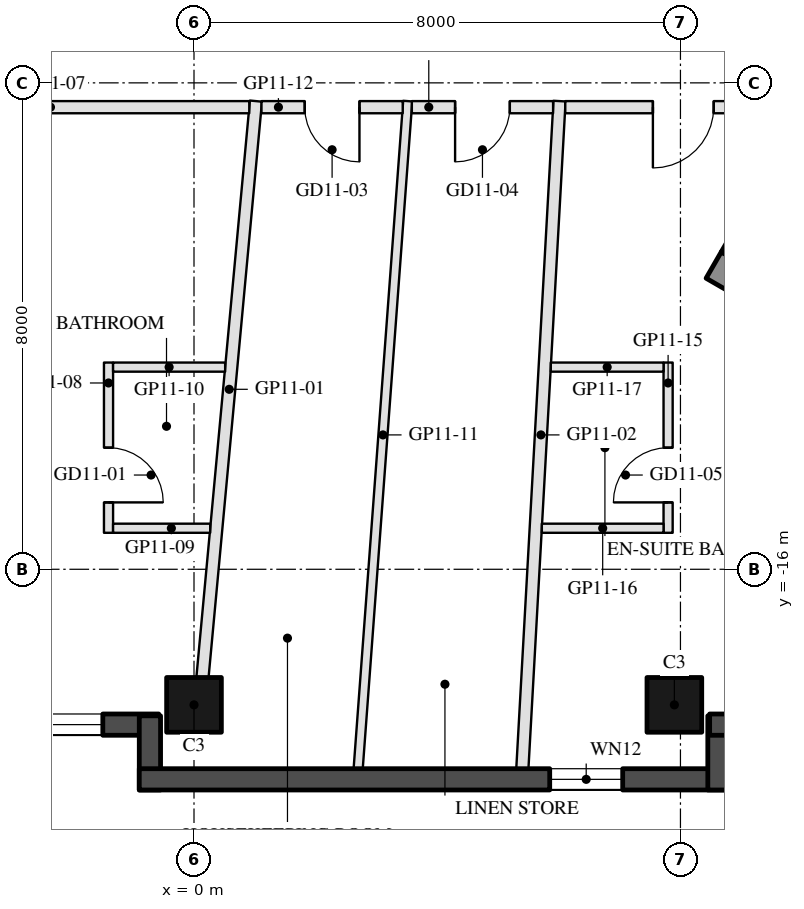
"""IFC4 building model, lengths in metres.
Left out: names, types, materials, properties, quantities, classifications, styles, units other than length and angle.
Written with IfcOpenShell. Run it as: python <this file> out.ifc"""

import sys

from ifc_helpers import new_model, si_unit, direction, frame, frame_2d, origin, origin_2d, place, context, subcontext, project, spatial, rectangle, hollow_rectangle, extrude, element, fill, save


model = new_model("IFC4")
c1 = context("Model", 3, precision=1e-05, world=origin(), true_north=direction((0.0, 1.0)))
c2 = subcontext(c1, "Body", "Model", "MODEL_VIEW")
j1 = project(units=[si_unit("LENGTHUNIT", "METRE"), si_unit("PLANEANGLEUNIT", "RADIAN")], contexts=[c1])
p1 = place(None, origin())
s1 = spatial("IfcSite", under=j1, at=p1, CompositionType="ELEMENT")
p2 = place(p1, origin())
s2 = spatial("IfcBuilding", under=s1, at=p2, CompositionType="ELEMENT")
p3 = place(p2, frame((0.0, 0.0, 124.2)))
s3 = spatial("IfcBuildingStorey", under=s2, at=p3, CompositionType="ELEMENT", Elevation=124.2)
for number, where, z_axis, x_axis in (
    (1, (0.0, -18.23, 0.0), (0.0, 0.0, 1.0), (-1.0, 0.0, 0.0)),
    (2, (7.9, -18.23, 0.0), (0.0, 0.0, 1.0), (-1.0, 0.0, 0.0)),
):
    element("IfcColumn", number, at=place(p3, frame(where, z_axis=z_axis, x_axis=x_axis)), inside=s3, PredefinedType="COLUMN", context=c2, shape_type="SweptSolid", body=[
        extrude(hollow_rectangle(XDim=0.9, YDim=0.9, WallThickness=0.04, at=origin_2d()), origin(), (0.0, 0.0, 1.0), 3.7),
    ])
p4 = place(p3, frame((-7.32, -18.555, 0.0), z_axis=(0.0, 0.0, 1.0), x_axis=(1.0, 0.0, 0.0)))
e3 = element("IfcWall", 3, at=p4, inside=s3, PredefinedType="SOLIDWALL", context=c2, shape_type="SweptSolid", body=[
    extrude(rectangle(XDim=6.74, YDim=0.35, at=frame_2d((3.37, 0.0))), origin(), (0.0, 0.0, 1.0), 3.55),
])
p5 = place(p4, frame((0.32, 0.0, 0.3)))
e4 = element("IfcOpeningElement", 4, at=p5, cuts=e3, PredefinedType="OPENING", context=c2, shape_type="SweptSolid", body=[
    extrude(rectangle(XDim=2.6, YDim=2.65, at=frame_2d((1.3, 1.325))), frame((0.0, 0.185, 0.0), z_axis=(0.0, -1.0, 0.0), x_axis=(1.0, 0.0, 0.0)), (0.0, 0.0, 1.0), 0.37),
])
p6 = place(p4, frame((3.22, 0.0, 0.3)))
e5 = element("IfcOpeningElement", 5, at=p6, cuts=e3, PredefinedType="OPENING", context=c2, shape_type="SweptSolid", body=[
    extrude(rectangle(XDim=2.6, YDim=2.65, at=frame_2d((1.3, 1.325))), frame((0.0, 0.185, 0.0), z_axis=(0.0, -1.0, 0.0), x_axis=(1.0, 0.0, 0.0)), (0.0, 0.0, 1.0), 0.37),
])
p7 = place(p3, frame((-0.725, -18.41, 0.0), z_axis=(0.0, 0.0, 1.0), x_axis=(0.0, -1.0, 0.0)))
e6 = element("IfcWall", 6, at=p7, inside=s3, PredefinedType="SOLIDWALL", context=c2, shape_type="SweptSolid", body=[
    extrude(rectangle(XDim=1.22, YDim=0.35, at=frame_2d((0.61, 0.0))), origin(), (0.0, 0.0, 1.0), 3.55),
])
p8 = place(p3, frame((-0.9, -19.455, 0.0), z_axis=(0.0, 0.0, 1.0), x_axis=(1.0, 0.0, 0.0)))
e7 = element("IfcWall", 7, at=p8, inside=s3, PredefinedType="SOLIDWALL", context=c2, shape_type="SweptSolid", body=[
    extrude(rectangle(XDim=9.7, YDim=0.35, at=frame_2d((4.85, 0.0))), origin(), (0.0, 0.0, 1.0), 3.55),
])
p9 = place(p8, frame((6.75, 0.0, 0.3)))
e8 = element("IfcOpeningElement", 8, at=p9, cuts=e7, PredefinedType="OPENING", context=c2, shape_type="SweptSolid", body=[
    extrude(rectangle(XDim=1.2, YDim=2.65, at=frame_2d((0.6, 1.325))), frame((0.0, 0.185, 0.0), z_axis=(0.0, -1.0, 0.0), x_axis=(1.0, 0.0, 0.0)), (0.0, 0.0, 1.0), 0.37),
])
p10 = place(p3, frame((8.625, -19.63, 0.0), z_axis=(0.0, 0.0, 1.0), x_axis=(0.0, 1.0, 0.0)))
e9 = element("IfcWall", 9, at=p10, inside=s3, PredefinedType="SOLIDWALL", context=c2, shape_type="SweptSolid", body=[
    extrude(rectangle(XDim=1.22, YDim=0.35, at=frame_2d((0.61, 0.0))), origin(), (0.0, 0.0, 1.0), 3.55),
])
p11 = place(p3, frame((8.48, -18.555, 0.0), z_axis=(0.0, 0.0, 1.0), x_axis=(1.0, 0.0, 0.0)))
e10 = element("IfcWall", 10, at=p11, inside=s3, PredefinedType="SOLIDWALL", context=c2, shape_type="SweptSolid", body=[
    extrude(rectangle(XDim=6.74, YDim=0.35, at=frame_2d((3.37, 0.0))), origin(), (0.0, 0.0, 1.0), 3.55),
])
p12 = place(p11, frame((0.32, 0.0, 0.0)))
e11 = element("IfcOpeningElement", 11, at=p12, cuts=e10, PredefinedType="OPENING", context=c2, shape_type="SweptSolid", body=[
    extrude(rectangle(XDim=2.4, YDim=2.4, at=frame_2d((1.2, 1.2))), frame((0.0, 0.185, 0.0), z_axis=(0.0, -1.0, 0.0), x_axis=(1.0, 0.0, 0.0)), (0.0, 0.0, 1.0), 0.37),
])
p13 = place(p11, frame((3.02, 0.0, 0.3)))
e12 = element("IfcOpeningElement", 12, at=p13, cuts=e10, PredefinedType="OPENING", context=c2, shape_type="SweptSolid", body=[
    extrude(rectangle(XDim=2.9, YDim=2.65, at=frame_2d((1.45, 1.325))), frame((0.0, 0.185, 0.0), z_axis=(0.0, -1.0, 0.0), x_axis=(1.0, 0.0, 0.0)), (0.0, 0.0, 1.0), 0.37),
])
p14 = place(p3, frame((8.547, -10.997, 0.0), z_axis=(0.0, 0.0, 1.0), x_axis=(0.866025009528, -0.500000682871, 0.0)))
e13 = element("IfcWall", 13, at=p14, inside=s3, PredefinedType="SHEAR", context=c2, shape_type="SweptSolid", body=[
    extrude(rectangle(XDim=14.837, YDim=0.5, at=frame_2d((7.418, 0.0))), origin(), (0.0, 0.0, 1.0), 3.5),
])
p15 = place(p3, frame((8.845, -10.88, 0.0), z_axis=(0.0, 0.0, 1.0), x_axis=(0.500004234368, 0.866022959057, 0.0)))
e14 = element("IfcWall", 14, at=p15, inside=s3, PredefinedType="SHEAR", context=c2, shape_type="SweptSolid", body=[
    extrude(rectangle(XDim=10.0, YDim=0.4, at=frame_2d((5.0, 0.0))), origin(), (0.0, 0.0, 1.0), 3.5),
])
p16 = place(p15, frame((3.55, 0.0, 0.0)))
e15 = element("IfcOpeningElement", 15, at=p16, cuts=e14, PredefinedType="OPENING", context=c2, shape_type="SweptSolid", body=[
    extrude(rectangle(XDim=1.1, YDim=2.1, at=frame_2d((0.55, 1.05))), frame((0.0, 0.21, 0.0), z_axis=(0.0, -1.0, 0.0), x_axis=(1.0, 0.0, 0.0)), (0.0, 0.0, 1.0), 0.42),
])
p17 = place(p15, frame((5.85, 0.0, 0.0)))
e16 = element("IfcOpeningElement", 16, at=p17, cuts=e14, PredefinedType="OPENING", context=c2, shape_type="SweptSolid", body=[
    extrude(rectangle(XDim=1.4, YDim=2.1, at=frame_2d((0.7, 1.05))), frame((0.0, 0.21, 0.0), z_axis=(0.0, -1.0, 0.0), x_axis=(1.0, 0.0, 0.0)), (0.0, 0.0, 1.0), 0.42),
])
p18 = place(p3, frame((0.139, -17.78, 0.0), z_axis=(0.0, 0.0, 1.0), x_axis=(0.092366768961, 0.995725052407, 0.0)))
e17 = element("IfcWall", 17, at=p18, inside=s3, PredefinedType="PARTITIONING", context=c2, shape_type="SweptSolid", body=[
    extrude(rectangle(XDim=9.521, YDim=0.2, at=frame_2d((4.76, 0.0))), origin(), (0.0, 0.0, 1.0), 2.95),
])
p19 = place(p3, frame((5.4, -19.28, 0.0), z_axis=(0.0, 0.0, 1.0), x_axis=(0.055568385591, 0.998454883569, 0.0)))
e18 = element("IfcWall", 18, at=p19, inside=s3, PredefinedType="PARTITIONING", context=c2, shape_type="SweptSolid", body=[
    extrude(rectangle(XDim=10.997, YDim=0.2, at=frame_2d((5.499, 0.0))), origin(), (0.0, 0.0, 1.0), 2.96),
])
p20 = place(p3, frame((0.909, -8.4, 0.0), z_axis=(0.0, 0.0, 1.0), x_axis=(-1.0, 0.0, 0.0)))
e19 = element("IfcWall", 19, at=p20, inside=s3, PredefinedType="PARTITIONING", context=c2, shape_type="SweptSolid", body=[
    extrude(rectangle(XDim=10.897, YDim=0.2, at=frame_2d((5.448, 0.0))), origin(), (0.0, 0.0, 1.0), 2.95),
])
p21 = place(p20, frame((4.948, 0.0, 0.0)))
e20 = element("IfcOpeningElement", 20, at=p21, cuts=e19, PredefinedType="OPENING", context=c2, shape_type="SweptSolid", body=[
    extrude(rectangle(XDim=1.0, YDim=2.1, at=frame_2d((0.5, 1.05))), frame((0.0, 0.11, 0.0), z_axis=(0.0, -1.0, 0.0), x_axis=(1.0, 0.0, 0.0)), (0.0, 0.0, 1.0), 0.22),
])
p22 = place(p3, frame((-1.406, -12.6, 0.0), z_axis=(0.0, 0.0, 1.0), x_axis=(0.0, -1.0, 0.0)))
e21 = element("IfcWall", 21, at=p22, inside=s3, PredefinedType="PARTITIONING", context=c2, shape_type="SweptSolid", body=[
    extrude(rectangle(XDim=2.8, YDim=0.15, at=frame_2d((1.4, 0.0))), origin(), (0.0, 0.0, 1.0), 3.55),
])
p23 = place(p22, frame((1.4, 0.0, 0.0)))
e22 = element("IfcOpeningElement", 22, at=p23, cuts=e21, PredefinedType="OPENING", context=c2, shape_type="SweptSolid", body=[
    extrude(rectangle(XDim=0.9, YDim=2.1, at=frame_2d((0.45, 1.05))), frame((0.0, 0.085, 0.0), z_axis=(0.0, -1.0, 0.0), x_axis=(1.0, 0.0, 0.0)), (0.0, 0.0, 1.0), 0.17),
])
p24 = place(p3, frame((-1.331, -15.325, 0.0), z_axis=(0.0, 0.0, 1.0), x_axis=(1.0, 0.0, 0.0)))
e23 = element("IfcWall", 23, at=p24, inside=s3, PredefinedType="PARTITIONING", context=c2, shape_type="SweptSolid", body=[
    extrude(rectangle(XDim=1.597, YDim=0.15, at=frame_2d((0.799, 0.0))), origin(), (0.0, 0.0, 1.0), 2.95),
])
p25 = place(p3, frame((-1.331, -12.675, 0.0), z_axis=(0.0, 0.0, 1.0), x_axis=(1.0, 0.0, 0.0)))
e24 = element("IfcWall", 24, at=p25, inside=s3, PredefinedType="PARTITIONING", context=c2, shape_type="SweptSolid", body=[
    extrude(rectangle(XDim=1.843, YDim=0.15, at=frame_2d((0.921, 0.0))), origin(), (0.0, 0.0, 1.0), 2.95),
])
p26 = place(p3, frame((2.7, -19.28, 0.0), z_axis=(0.0, 0.0, 1.0), x_axis=(0.074017071658, 0.997256974457, 0.0)))
e25 = element("IfcWall", 25, at=p26, inside=s3, PredefinedType="PARTITIONING", context=c2, shape_type="SweptSolid", body=[
    extrude(rectangle(XDim=11.01, YDim=0.15, at=frame_2d((5.505, 0.0))), origin(), (0.0, 0.0, 1.0), 2.96),
])
p27 = place(p3, frame((3.432, -8.4, 0.0), z_axis=(0.0, 0.0, 1.0), x_axis=(-1.0, 0.0, 0.0)))
e26 = element("IfcWall", 26, at=p27, inside=s3, PredefinedType="PARTITIONING", context=c2, shape_type="SweptSolid", body=[
    extrude(rectangle(XDim=2.323, YDim=0.2, at=frame_2d((1.161, 0.0))), origin(), (0.0, 0.0, 1.0), 3.55),
])
p28 = place(p27, frame((0.711, 0.0, 0.0)))
e27 = element("IfcOpeningElement", 27, at=p28, cuts=e26, PredefinedType="OPENING", context=c2, shape_type="SweptSolid", body=[
    extrude(rectangle(XDim=0.9, YDim=2.1, at=frame_2d((0.45, 1.05))), frame((0.0, 0.11, 0.0), z_axis=(0.0, -1.0, 0.0), x_axis=(1.0, 0.0, 0.0)), (0.0, 0.0, 1.0), 0.22),
])
p29 = place(p3, frame((5.906, -8.4, 0.0), z_axis=(0.0, 0.0, 1.0), x_axis=(-1.0, 0.0, 0.0)))
e28 = element("IfcWall", 28, at=p29, inside=s3, PredefinedType="PARTITIONING", context=c2, shape_type="SweptSolid", body=[
    extrude(rectangle(XDim=2.323, YDim=0.2, at=frame_2d((1.162, 0.0))), origin(), (0.0, 0.0, 1.0), 2.95),
])
p30 = place(p29, frame((0.711, 0.0, 0.0)))
e29 = element("IfcOpeningElement", 29, at=p30, cuts=e28, PredefinedType="OPENING", context=c2, shape_type="SweptSolid", body=[
    extrude(rectangle(XDim=0.9, YDim=2.1, at=frame_2d((0.45, 1.05))), frame((0.0, 0.11, 0.0), z_axis=(0.0, -1.0, 0.0), x_axis=(1.0, 0.0, 0.0)), (0.0, 0.0, 1.0), 0.22),
])
p31 = place(p3, frame((9.988, -8.4, 0.0), z_axis=(0.0, 0.0, 1.0), x_axis=(-1.0, 0.0, 0.0)))
e30 = element("IfcWall", 30, at=p31, inside=s3, PredefinedType="PARTITIONING", context=c2, shape_type="SweptSolid", body=[
    extrude(rectangle(XDim=3.883, YDim=0.2, at=frame_2d((1.941, 0.0))), origin(), (0.0, 0.0, 1.0), 2.95),
])
p32 = place(p31, frame((1.441, 0.0, 0.0)))
e31 = element("IfcOpeningElement", 31, at=p32, cuts=e30, PredefinedType="OPENING", context=c2, shape_type="SweptSolid", body=[
    extrude(rectangle(XDim=1.0, YDim=2.1, at=frame_2d((0.5, 1.05))), frame((0.0, 0.11, 0.0), z_axis=(0.0, -1.0, 0.0), x_axis=(1.0, 0.0, 0.0)), (0.0, 0.0, 1.0), 0.22),
])
p33 = place(p3, frame((7.797, -15.4, 0.0), z_axis=(0.0, 0.0, 1.0), x_axis=(0.0, 1.0, 0.0)))
e32 = element("IfcWall", 32, at=p33, inside=s3, PredefinedType="PARTITIONING", context=c2, shape_type="SweptSolid", body=[
    extrude(rectangle(XDim=2.8, YDim=0.15, at=frame_2d((1.4, 0.0))), origin(), (0.0, 0.0, 1.0), 2.95),
])
p34 = place(p33, frame((0.5, 0.0, 0.0)))
e33 = element("IfcOpeningElement", 33, at=p34, cuts=e32, PredefinedType="OPENING", context=c2, shape_type="SweptSolid", body=[
    extrude(rectangle(XDim=0.9, YDim=2.1, at=frame_2d((0.45, 1.05))), frame((0.0, 0.085, 0.0), z_axis=(0.0, -1.0, 0.0), x_axis=(1.0, 0.0, 0.0)), (0.0, 0.0, 1.0), 0.17),
])
p35 = place(p3, frame((5.72, -15.325, 0.0), z_axis=(0.0, 0.0, 1.0), x_axis=(1.0, 0.0, 0.0)))
e34 = element("IfcWall", 34, at=p35, inside=s3, PredefinedType="PARTITIONING", context=c2, shape_type="SweptSolid", body=[
    extrude(rectangle(XDim=2.002, YDim=0.15, at=frame_2d((1.001, 0.0))), origin(), (0.0, 0.0, 1.0), 3.55),
])
p36 = place(p3, frame((5.868, -12.675, 0.0), z_axis=(0.0, 0.0, 1.0), x_axis=(1.0, 0.0, 0.0)))
e35 = element("IfcWall", 35, at=p36, inside=s3, PredefinedType="PARTITIONING", context=c2, shape_type="SweptSolid", body=[
    extrude(rectangle(XDim=1.854, YDim=0.15, at=frame_2d((0.927, 0.0))), origin(), (0.0, 0.0, 1.0), 3.55),
])
p37 = place(p6, origin())
e36 = element("IfcWindow", 36, at=p37, inside=s3, PartitioningType="SINGLE_PANEL", PredefinedType="WINDOW", context=c2, shape_type="SweptSolid", body=[
    extrude(rectangle(XDim=2.6, YDim=2.65, at=frame_2d((1.3, 1.325))), frame((0.0, 0.03, 0.0), z_axis=(0.0, -1.0, 0.0), x_axis=(1.0, 0.0, 0.0)), (0.0, 0.0, 1.0), 0.06),
])
fill(e5, e36)
p38 = place(p9, origin())
e37 = element("IfcWindow", 37, at=p38, inside=s3, PartitioningType="SINGLE_PANEL", PredefinedType="WINDOW", context=c2, shape_type="SweptSolid", body=[
    extrude(rectangle(XDim=1.2, YDim=2.65, at=frame_2d((0.6, 1.325))), frame((0.0, 0.03, 0.0), z_axis=(0.0, -1.0, 0.0), x_axis=(1.0, 0.0, 0.0)), (0.0, 0.0, 1.0), 0.06),
])
fill(e8, e37)
p39 = place(p23, origin())
e38 = element("IfcDoor", 38, at=p39, inside=s3, OperationType="SINGLE_SWING_RIGHT", PredefinedType="DOOR", context=c2, shape_type="SweptSolid", body=[
    extrude(rectangle(XDim=0.9, YDim=2.1, at=frame_2d((0.45, 1.05))), frame((0.0, 0.025, 0.0), z_axis=(0.0, -1.0, 0.0), x_axis=(1.0, 0.0, 0.0)), (0.0, 0.0, 1.0), 0.05),
])
fill(e22, e38)
p40 = place(p28, origin())
e39 = element("IfcDoor", 39, at=p40, inside=s3, OperationType="SINGLE_SWING_LEFT", PredefinedType="DOOR", context=c2, shape_type="SweptSolid", body=[
    extrude(rectangle(XDim=0.9, YDim=2.1, at=frame_2d((0.45, 1.05))), frame((0.0, 0.025, 0.0), z_axis=(0.0, -1.0, 0.0), x_axis=(1.0, 0.0, 0.0)), (0.0, 0.0, 1.0), 0.05),
])
fill(e27, e39)
p41 = place(p30, origin())
e40 = element("IfcDoor", 40, at=p41, inside=s3, OperationType="SINGLE_SWING_RIGHT", PredefinedType="DOOR", context=c2, shape_type="SweptSolid", body=[
    extrude(rectangle(XDim=0.9, YDim=2.1, at=frame_2d((0.45, 1.05))), frame((0.0, 0.025, 0.0), z_axis=(0.0, -1.0, 0.0), x_axis=(1.0, 0.0, 0.0)), (0.0, 0.0, 1.0), 0.05),
])
fill(e29, e40)
p42 = place(p34, origin())
e41 = element("IfcDoor", 41, at=p42, inside=s3, OperationType="SINGLE_SWING_LEFT", PredefinedType="DOOR", context=c2, shape_type="SweptSolid", body=[
    extrude(rectangle(XDim=0.9, YDim=2.1, at=frame_2d((0.45, 1.05))), frame((0.0, 0.025, 0.0), z_axis=(0.0, -1.0, 0.0), x_axis=(1.0, 0.0, 0.0)), (0.0, 0.0, 1.0), 0.05),
])
fill(e33, e41)
p43 = place(p32, origin())
e42 = element("IfcDoor", 42, at=p43, inside=s3, OperationType="SINGLE_SWING_RIGHT", PredefinedType="DOOR", context=c2, shape_type="SweptSolid", body=[
    extrude(rectangle(XDim=1.0, YDim=2.1, at=frame_2d((0.5, 1.05))), frame((0.0, 0.025, 0.0), z_axis=(0.0, -1.0, 0.0), x_axis=(1.0, 0.0, 0.0)), (0.0, 0.0, 1.0), 0.05),
])
fill(e31, e42)
save(model, sys.argv[1])
